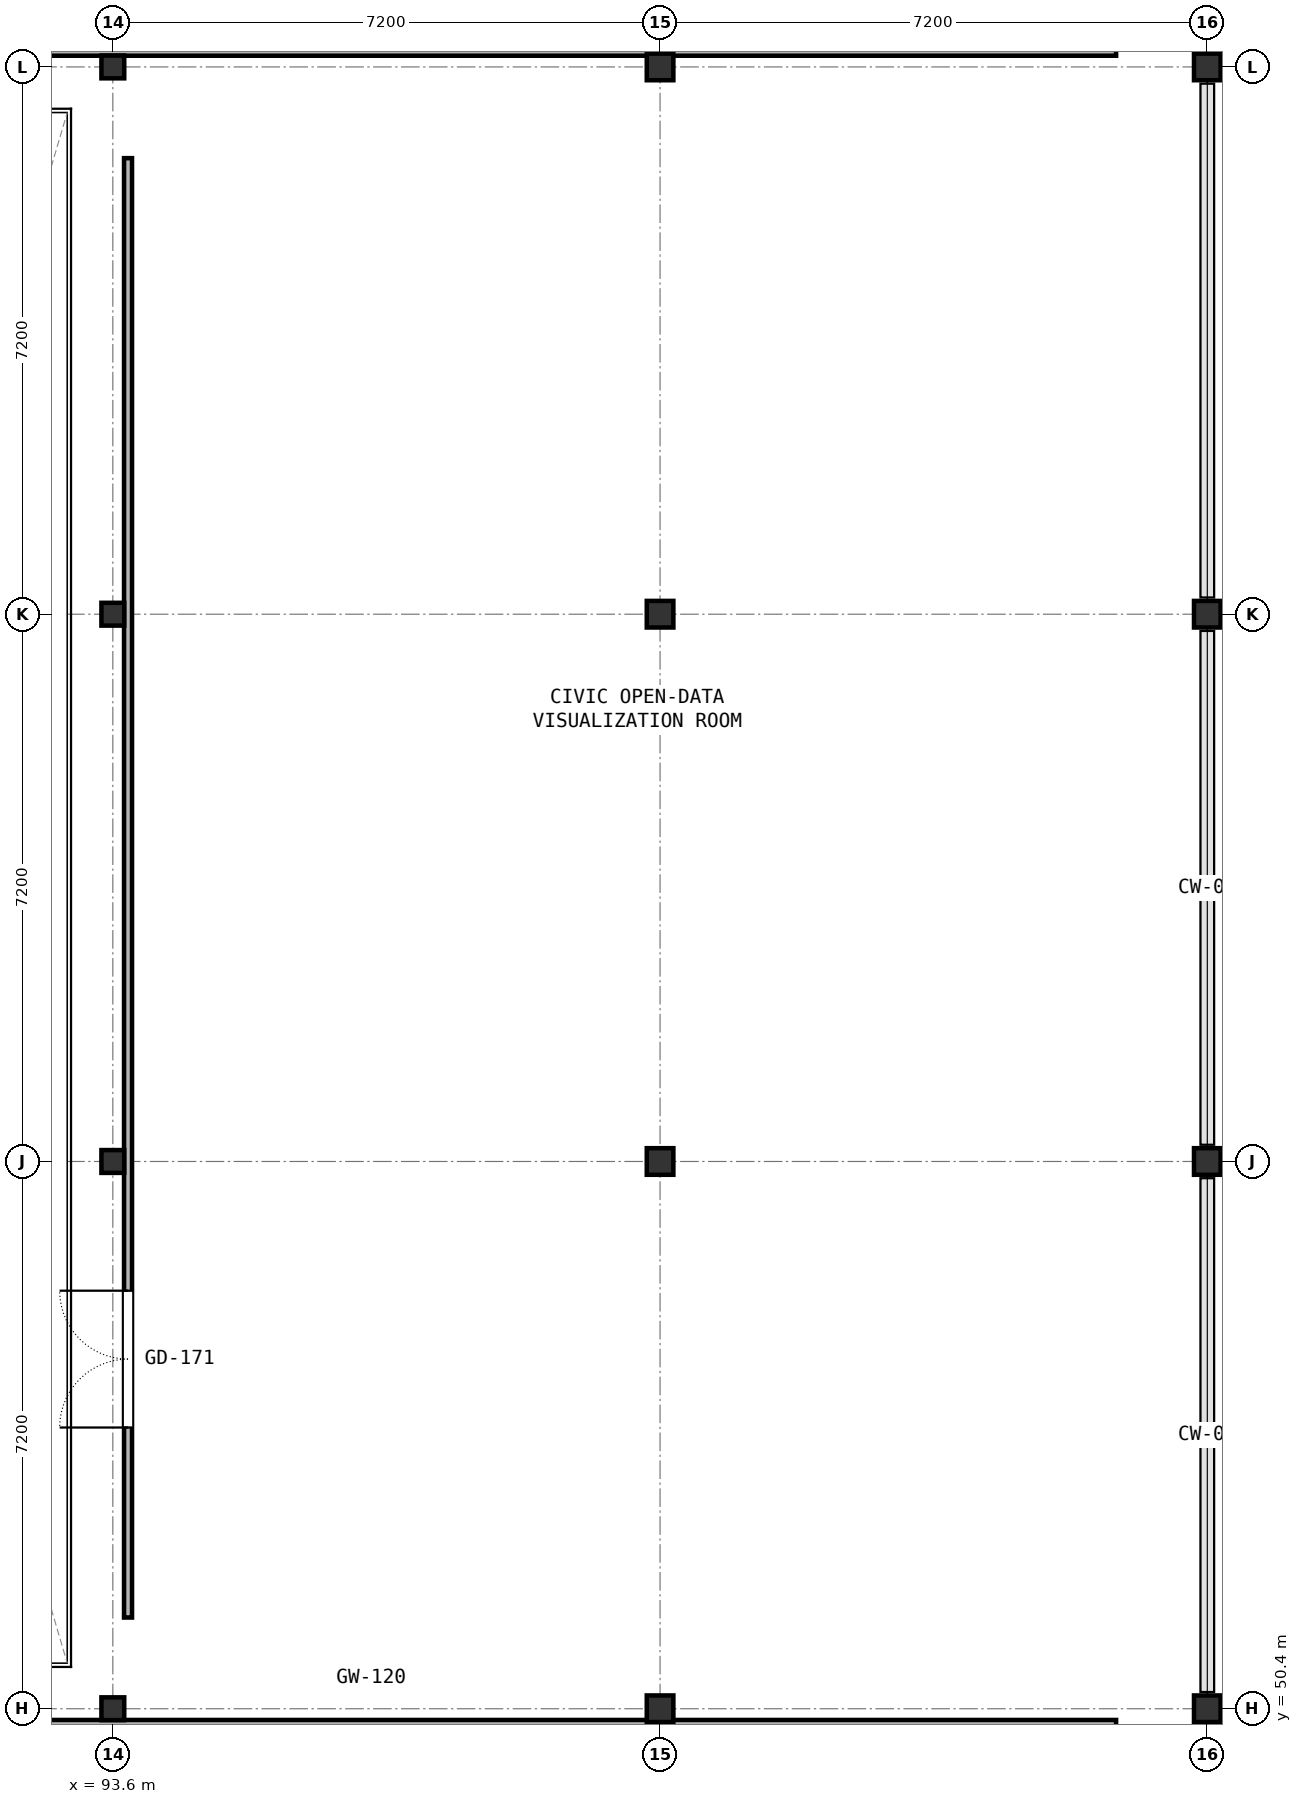
"""IFC4 building model, lengths in metres.
Left out: names, types, materials, properties, quantities, classifications, styles, units other than length and angle.
Written with IfcOpenShell. Run it as: python <this file> out.ifc"""

import sys

from ifc_helpers import new_model, si_unit, direction, frame, frame_2d, origin, origin_2d, place, context, subcontext, project, spatial, rectangle, hollow_rectangle, i_section, extrude, element, fill, save


model = new_model("IFC4")
c1 = context("Model", 3, precision=1e-05, world=origin(), true_north=direction((0.0, 1.0)))
c2 = subcontext(c1, "Body", "Model", "MODEL_VIEW")
j1 = project(units=[si_unit("LENGTHUNIT", "METRE"), si_unit("PLANEANGLEUNIT", "RADIAN")], contexts=[c1])
p1 = place(None, origin())
s1 = spatial("IfcSite", under=j1, at=p1, CompositionType="ELEMENT")
p2 = place(p1, origin())
s2 = spatial("IfcBuilding", under=s1, at=p2, CompositionType="ELEMENT")
p3 = place(p2, frame((0.0, 0.0, 10.2)))
s3 = spatial("IfcBuildingStorey", under=s2, at=p3, CompositionType="ELEMENT", Elevation=10.2)
for number, where, z_axis, x_axis in (
    (1, (93.6, 50.4, 0.0), (0.0, 0.0, 1.0), (1.0, 0.0, 0.0)),
    (2, (93.6, 57.6, 0.0), (0.0, 0.0, 1.0), (1.0, 0.0, 0.0)),
    (3, (93.6, 64.8, 0.0), (0.0, 0.0, 1.0), (1.0, 0.0, 0.0)),
    (4, (93.6, 72.0, 0.0), (0.0, 0.0, 1.0), (1.0, 0.0, 0.0)),
):
    element("IfcColumn", number, at=place(p3, frame(where, z_axis=z_axis, x_axis=x_axis)), inside=s3, PredefinedType="COLUMN", context=c2, shape_type="SweptSolid", body=[
        extrude(hollow_rectangle(XDim=0.3, YDim=0.3, WallThickness=0.012, InnerFilletRadius=0.012, OuterFilletRadius=0.024, at=origin_2d()), origin(), (0.0, 0.0, 1.0), 4.2),
    ])
for number, where, z_axis, x_axis in (
    (5, (100.8, 50.4, 0.0), (0.0, 0.0, 1.0), (1.0, 0.0, 0.0)),
    (6, (100.8, 57.6, 0.0), (0.0, 0.0, 1.0), (1.0, 0.0, 0.0)),
    (7, (100.8, 64.8, 0.0), (0.0, 0.0, 1.0), (1.0, 0.0, 0.0)),
    (8, (100.8, 72.0, 0.0), (0.0, 0.0, 1.0), (1.0, 0.0, 0.0)),
    (9, (108.0, 50.4, 0.0), (0.0, 0.0, 1.0), (1.0, 0.0, 0.0)),
    (10, (108.0, 57.6, 0.0), (0.0, 0.0, 1.0), (1.0, 0.0, 0.0)),
    (11, (108.0, 64.8, 0.0), (0.0, 0.0, 1.0), (1.0, 0.0, 0.0)),
    (12, (108.0, 72.0, 0.0), (0.0, 0.0, 1.0), (1.0, 0.0, 0.0)),
):
    element("IfcColumn", number, at=place(p3, frame(where, z_axis=z_axis, x_axis=x_axis)), inside=s3, PredefinedType="COLUMN", context=c2, shape_type="SweptSolid", body=[
        extrude(i_section(OverallWidth=0.35, OverallDepth=0.35, WebThickness=0.012, FlangeThickness=0.019, FilletRadius=0.02, at=origin_2d()), origin(), (0.0, 0.0, 1.0), 4.2),
    ])
p4 = place(p3, frame((87.2, 50.2, 0.0), z_axis=(0.0, 0.0, 1.0), x_axis=(1.0, 0.0, 0.0)))
e13 = element("IfcWall", 13, at=p4, inside=s3, PredefinedType="PARTITIONING", context=c2, shape_type="SweptSolid", body=[
    extrude(rectangle(XDim=19.6, YDim=0.105, at=frame_2d((9.8, 0.0))), origin(), (0.0, 0.0, 1.0), 3.08),
])
p5 = place(p4, frame((2.5, 0.0, 0.0)))
e14 = element("IfcOpeningElement", 14, at=p5, cuts=e13, PredefinedType="OPENING", context=c2, shape_type="SweptSolid", body=[
    extrude(rectangle(XDim=1.8, YDim=2.2, at=frame_2d((0.9, 1.1))), frame((0.0, 0.062, 0.0), z_axis=(0.0, -1.0, 0.0), x_axis=(1.0, 0.0, 0.0)), (0.0, 0.0, 1.0), 0.125),
])
p6 = place(p3, frame((87.2, 72.2, 0.0), z_axis=(0.0, 0.0, 1.0), x_axis=(1.0, 0.0, 0.0)))
e15 = element("IfcWall", 15, at=p6, inside=s3, PredefinedType="PARTITIONING", context=c2, shape_type="SweptSolid", body=[
    extrude(rectangle(XDim=19.6, YDim=0.105, at=frame_2d((9.8, 0.0))), origin(), (0.0, 0.0, 1.0), 3.08),
])
p7 = place(p6, frame((2.5, 0.0, 0.0)))
e16 = element("IfcOpeningElement", 16, at=p7, cuts=e15, PredefinedType="OPENING", context=c2, shape_type="SweptSolid", body=[
    extrude(rectangle(XDim=1.8, YDim=2.2, at=frame_2d((0.9, 1.1))), frame((0.0, 0.062, 0.0), z_axis=(0.0, -1.0, 0.0), x_axis=(1.0, 0.0, 0.0)), (0.0, 0.0, 1.0), 0.125),
])
p8 = place(p3, frame((93.8, 51.6, 0.0), z_axis=(0.0, 0.0, 1.0), x_axis=(0.0, 1.0, 0.0)))
e17 = element("IfcWall", 17, at=p8, inside=s3, PredefinedType="PARTITIONING", context=c2, shape_type="SweptSolid", body=[
    extrude(rectangle(XDim=19.2, YDim=0.105, at=frame_2d((9.6, 0.0))), origin(), (0.0, 0.0, 1.0), 3.08),
])
p9 = place(p8, frame((2.5, 0.0, 0.0)))
e18 = element("IfcOpeningElement", 18, at=p9, cuts=e17, PredefinedType="OPENING", context=c2, shape_type="SweptSolid", body=[
    extrude(rectangle(XDim=1.8, YDim=2.2, at=frame_2d((0.9, 1.1))), frame((0.0, 0.062, 0.0), z_axis=(0.0, -1.0, 0.0), x_axis=(1.0, 0.0, 0.0)), (0.0, 0.0, 1.0), 0.125),
])
p10 = place(p9, origin())
e19 = element("IfcDoor", 19, at=p10, inside=s3, OperationType="DOUBLE_DOOR_SINGLE_SWING", PredefinedType="DOOR", context=c2, shape_type="SweptSolid", body=[
    extrude(rectangle(XDim=1.8, YDim=2.2, at=frame_2d((0.9, 1.1))), frame((0.0, 0.025, 0.0), z_axis=(0.0, -1.0, 0.0), x_axis=(1.0, 0.0, 0.0)), (0.0, 0.0, 1.0), 0.05),
])
fill(e18, e19)
save(model, sys.argv[1])
